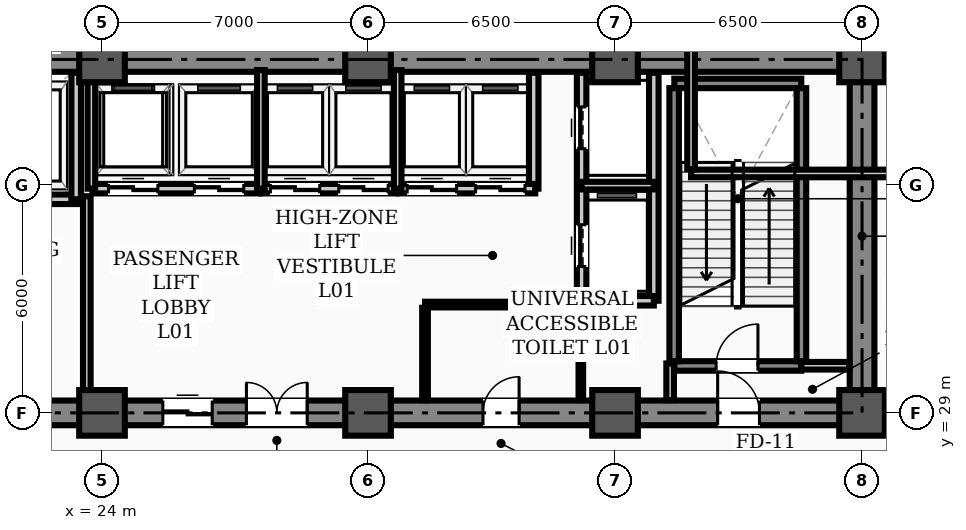
"""IFC4 building model, lengths in metres.
Left out: names, types, materials, properties, quantities, classifications, styles, units other than length and angle.
Written with IfcOpenShell. Run it as: python <this file> out.ifc"""

import sys

from ifc_helpers import new_model, si_unit, direction, frame, frame_2d, origin, origin_2d, place, context, subcontext, project, spatial, rectangle, hollow_rectangle, extrude, element, fill, save


model = new_model("IFC4")
c1 = context("Model", 3, precision=1e-05, world=origin(), true_north=direction((0.0, 1.0)))
c2 = subcontext(c1, "Body", "Model", "MODEL_VIEW")
j1 = project(units=[si_unit("LENGTHUNIT", "METRE"), si_unit("PLANEANGLEUNIT", "RADIAN")], contexts=[c1])
p1 = place(None, origin())
s1 = spatial("IfcSite", under=j1, at=p1, CompositionType="ELEMENT")
p2 = place(p1, origin())
s2 = spatial("IfcBuilding", under=s1, at=p2, CompositionType="ELEMENT")
p3 = place(p2, origin())
s3 = spatial("IfcBuildingStorey", under=s2, at=p3, CompositionType="ELEMENT", Elevation=0.0)
for number, where, z_axis, x_axis in (
    (1, (24.0, 29.0, 0.0), (0.0, 0.0, 1.0), (1.0, 0.0, 0.0)),
    (2, (24.0, 38.3, 0.0), (0.0, 0.0, 1.0), (1.0, 0.0, 0.0)),
    (3, (31.0, 29.0, 0.0), (0.0, 0.0, 1.0), (1.0, 0.0, 0.0)),
    (4, (31.0, 38.3, 0.0), (0.0, 0.0, 1.0), (1.0, 0.0, 0.0)),
    (5, (37.5, 29.0, 0.0), (0.0, 0.0, 1.0), (1.0, 0.0, 0.0)),
    (6, (37.5, 38.3, 0.0), (0.0, 0.0, 1.0), (1.0, 0.0, 0.0)),
    (7, (44.0, 29.0, 0.0), (0.0, 0.0, 1.0), (1.0, 0.0, 0.0)),
    (8, (44.0, 38.3, 0.0), (0.0, 0.0, 1.0), (1.0, 0.0, 0.0)),
):
    element("IfcColumn", number, at=place(p3, frame(where, z_axis=z_axis, x_axis=x_axis)), inside=s3, PredefinedType="COLUMN", context=c2, shape_type="SweptSolid", body=[
        extrude(hollow_rectangle(XDim=1.2, YDim=1.2, WallThickness=0.04, InnerFilletRadius=0.02, OuterFilletRadius=0.06, at=origin_2d()), origin(), (0.0, 0.0, 1.0), 5.8),
    ])
p4 = place(p3, frame((13.5, 29.0, 0.0), z_axis=(0.0, 0.0, 1.0), x_axis=(1.0, 0.0, 0.0)))
e9 = element("IfcWall", 9, at=p4, inside=s3, PredefinedType="SHEAR", context=c2, shape_type="SweptSolid", body=[
    extrude(rectangle(XDim=30.5, YDim=0.65, at=frame_2d((15.25, 0.0))), origin(), (0.0, 0.0, 1.0), 5.55),
])
p5 = place(p4, frame((1.75, 0.0, 0.0)))
e10 = element("IfcOpeningElement", 10, at=p5, cuts=e9, PredefinedType="OPENING", context=c2, shape_type="SweptSolid", body=[
    extrude(rectangle(XDim=1.1, YDim=2.08, at=frame_2d((0.55, 1.04))), frame((0.0, 0.335, 0.0), z_axis=(0.0, -1.0, 0.0), x_axis=(1.0, 0.0, 0.0)), (0.0, 0.0, 1.0), 0.67),
])
p6 = place(p4, frame((26.7, 0.0, 0.0)))
e11 = element("IfcOpeningElement", 11, at=p6, cuts=e9, PredefinedType="OPENING", context=c2, shape_type="SweptSolid", body=[
    extrude(rectangle(XDim=1.1, YDim=2.08, at=frame_2d((0.55, 1.04))), frame((0.0, 0.335, 0.0), z_axis=(0.0, -1.0, 0.0), x_axis=(1.0, 0.0, 0.0)), (0.0, 0.0, 1.0), 0.67),
])
p7 = place(p4, frame((6.8, 0.0, 0.0)))
e12 = element("IfcOpeningElement", 12, at=p7, cuts=e9, PredefinedType="OPENING", context=c2, shape_type="SweptSolid", body=[
    extrude(rectangle(XDim=1.1, YDim=2.08, at=frame_2d((0.55, 1.04))), frame((0.0, 0.335, 0.0), z_axis=(0.0, -1.0, 0.0), x_axis=(1.0, 0.0, 0.0)), (0.0, 0.0, 1.0), 0.67),
])
p8 = place(p4, frame((14.3, 0.0, 0.0)))
e13 = element("IfcOpeningElement", 13, at=p8, cuts=e9, PredefinedType="OPENING", context=c2, shape_type="SweptSolid", body=[
    extrude(rectangle(XDim=1.6, YDim=2.08, at=frame_2d((0.8, 1.04))), frame((0.0, 0.335, 0.0), z_axis=(0.0, -1.0, 0.0), x_axis=(1.0, 0.0, 0.0)), (0.0, 0.0, 1.0), 0.67),
])
p9 = place(p4, frame((20.525, 0.0, 0.0)))
e14 = element("IfcOpeningElement", 14, at=p9, cuts=e9, PredefinedType="OPENING", context=c2, shape_type="SweptSolid", body=[
    extrude(rectangle(XDim=0.95, YDim=2.08, at=frame_2d((0.475, 1.04))), frame((0.0, 0.335, 0.0), z_axis=(0.0, -1.0, 0.0), x_axis=(1.0, 0.0, 0.0)), (0.0, 0.0, 1.0), 0.67),
])
p10 = place(p4, frame((12.1, 0.0, 0.0)))
e15 = element("IfcOpeningElement", 15, at=p10, cuts=e9, PredefinedType="OPENING", context=c2, shape_type="SweptSolid", body=[
    extrude(rectangle(XDim=1.3, YDim=2.08, at=frame_2d((0.65, 1.04))), frame((0.0, 0.335, 0.0), z_axis=(0.0, -1.0, 0.0), x_axis=(1.0, 0.0, 0.0)), (0.0, 0.0, 1.0), 0.67),
])
p11 = place(p3, frame((13.5, 38.3, 0.0), z_axis=(0.0, 0.0, 1.0), x_axis=(1.0, 0.0, 0.0)))
e16 = element("IfcWall", 16, at=p11, inside=s3, PredefinedType="SHEAR", context=c2, shape_type="SweptSolid", body=[
    extrude(rectangle(XDim=30.5, YDim=0.65, at=frame_2d((15.25, 0.0))), origin(), (0.0, 0.0, 1.0), 5.55),
])
p12 = place(p3, frame((44.0, 29.35, 0.0), z_axis=(0.0, 0.0, 1.0), x_axis=(0.0, 1.0, 0.0)))
e17 = element("IfcWall", 17, at=p12, inside=s3, PredefinedType="SHEAR", context=c2, shape_type="SweptSolid", body=[
    extrude(rectangle(XDim=8.6, YDim=0.65, at=frame_2d((4.3, 0.0))), origin(), (0.0, 0.0, 1.0), 5.55),
])
p13 = place(p3, frame((39.06, 30.235, 0.0), z_axis=(0.0, 0.0, 1.0), x_axis=(1.0, 0.0, 0.0)))
e18 = element("IfcWall", 18, at=p13, inside=s3, PredefinedType="STANDARD", context=c2, shape_type="SweptSolid", body=[
    extrude(rectangle(XDim=3.34, YDim=0.25, at=frame_2d((1.67, 0.0))), origin(), (0.0, 0.0, 1.0), 5.55),
])
p14 = place(p13, frame((1.1, 0.0, 0.0)))
e19 = element("IfcOpeningElement", 19, at=p14, cuts=e18, PredefinedType="OPENING", context=c2, shape_type="SweptSolid", body=[
    extrude(rectangle(XDim=1.1, YDim=2.08, at=frame_2d((0.55, 1.04))), frame((0.0, 0.135, 0.0), z_axis=(0.0, -1.0, 0.0), x_axis=(1.0, 0.0, 0.0)), (0.0, 0.0, 1.0), 0.27),
])
p15 = place(p3, frame((39.06, 37.669, 0.0), z_axis=(0.0, 0.0, 1.0), x_axis=(1.0, 0.0, 0.0)))
e20 = element("IfcWall", 20, at=p15, inside=s3, PredefinedType="STANDARD", context=c2, shape_type="SweptSolid", body=[
    extrude(rectangle(XDim=3.34, YDim=0.25, at=frame_2d((1.67, 0.0))), origin(), (0.0, 0.0, 1.0), 5.55),
])
for number, where, z_axis, x_axis in (
    (21, (39.055, 30.36, 0.0), (0.0, 0.0, 1.0), (0.0, 1.0, 0.0)),
    (22, (42.405, 30.36, 0.0), (0.0, 0.0, 1.0), (0.0, 1.0, 0.0)),
):
    element("IfcWall", number, at=place(p3, frame(where, z_axis=z_axis, x_axis=x_axis)), inside=s3, PredefinedType="STANDARD", context=c2, shape_type="SweptSolid", body=[
        extrude(rectangle(XDim=7.184, YDim=0.25, at=frame_2d((3.592, 0.0))), origin(), (0.0, 0.0, 1.0), 5.55),
    ])
p16 = place(p3, frame((18.1, 34.62, 0.0), z_axis=(0.0, 0.0, 1.0), x_axis=(1.0, 0.0, 0.0)))
e23 = element("IfcWall", 23, at=p16, inside=s3, PredefinedType="STANDARD", context=c2, shape_type="SweptSolid", body=[
    extrude(rectangle(XDim=5.35, YDim=0.25, at=frame_2d((2.675, 0.0))), origin(), (0.0, 0.0, 1.0), 5.55),
])
p17 = place(p16, frame((0.85, 0.0, 0.0)))
e24 = element("IfcOpeningElement", 24, at=p17, cuts=e23, PredefinedType="OPENING", context=c2, shape_type="SweptSolid", body=[
    extrude(rectangle(XDim=1.1, YDim=2.08, at=frame_2d((0.55, 1.04))), frame((0.0, 0.135, 0.0), z_axis=(0.0, -1.0, 0.0), x_axis=(1.0, 0.0, 0.0)), (0.0, 0.0, 1.0), 0.27),
])
p18 = place(p16, frame((3.45, 0.0, 0.0)))
e25 = element("IfcOpeningElement", 25, at=p18, cuts=e23, PredefinedType="OPENING", context=c2, shape_type="SweptSolid", body=[
    extrude(rectangle(XDim=1.1, YDim=2.08, at=frame_2d((0.55, 1.04))), frame((0.0, 0.135, 0.0), z_axis=(0.0, -1.0, 0.0), x_axis=(1.0, 0.0, 0.0)), (0.0, 0.0, 1.0), 0.27),
])
p19 = place(p3, frame((36.62, 31.95, 0.0), z_axis=(0.0, 0.0, 1.0), x_axis=(0.0, 1.0, 0.0)))
e26 = element("IfcWall", 26, at=p19, inside=s3, PredefinedType="STANDARD", context=c2, shape_type="SweptSolid", body=[
    extrude(rectangle(XDim=6.0, YDim=0.25, at=frame_2d((3.0, 0.0))), origin(), (0.0, 0.0, 1.0), 4.73),
])
p20 = place(p19, frame((0.9, 0.0, 0.0)))
e27 = element("IfcOpeningElement", 27, at=p20, cuts=e26, PredefinedType="OPENING", context=c2, shape_type="SweptSolid", body=[
    extrude(rectangle(XDim=1.1, YDim=2.08, at=frame_2d((0.55, 1.04))), frame((0.0, 0.135, 0.0), z_axis=(0.0, -1.0, 0.0), x_axis=(1.0, 0.0, 0.0)), (0.0, 0.0, 1.0), 0.27),
])
p21 = place(p19, frame((4.0, 0.0, 0.0)))
e28 = element("IfcOpeningElement", 28, at=p21, cuts=e26, PredefinedType="OPENING", context=c2, shape_type="SweptSolid", body=[
    extrude(rectangle(XDim=1.1, YDim=2.08, at=frame_2d((0.55, 1.04))), frame((0.0, 0.135, 0.0), z_axis=(0.0, -1.0, 0.0), x_axis=(1.0, 0.0, 0.0)), (0.0, 0.0, 1.0), 0.27),
])
p22 = place(p3, frame((38.52, 31.95, 0.0), z_axis=(0.0, 0.0, 1.0), x_axis=(0.0, 1.0, 0.0)))
e29 = element("IfcWall", 29, at=p22, inside=s3, PredefinedType="STANDARD", context=c2, shape_type="SweptSolid", body=[
    extrude(rectangle(XDim=6.0, YDim=0.25, at=frame_2d((3.0, 0.0))), origin(), (0.0, 0.0, 1.0), 4.73),
])
p23 = place(p3, frame((36.62, 31.95, 0.0), z_axis=(0.0, 0.0, 1.0), x_axis=(1.0, 0.0, 0.0)))
e30 = element("IfcWall", 30, at=p23, inside=s3, PredefinedType="STANDARD", context=c2, shape_type="SweptSolid", body=[
    extrude(rectangle(XDim=1.9, YDim=0.25, at=frame_2d((0.95, 0.0))), origin(), (0.0, 0.0, 1.0), 5.38),
])
p24 = place(p3, frame((23.32, 34.62, 0.0), z_axis=(0.0, 0.0, 1.0), x_axis=(0.0, 1.0, 0.0)))
e31 = element("IfcWall", 31, at=p24, inside=s3, PredefinedType="STANDARD", context=c2, shape_type="SweptSolid", body=[
    extrude(rectangle(XDim=3.33, YDim=0.25, at=frame_2d((1.665, 0.0))), origin(), (0.0, 0.0, 1.0), 4.73),
])
p25 = place(p3, frame((35.36, 34.9, 0.0), z_axis=(0.0, 0.0, 1.0), x_axis=(0.0, 1.0, 0.0)))
e32 = element("IfcWall", 32, at=p25, inside=s3, PredefinedType="STANDARD", context=c2, shape_type="SweptSolid", body=[
    extrude(rectangle(XDim=3.05, YDim=0.25, at=frame_2d((1.525, 0.0))), origin(), (0.0, 0.0, 1.0), 4.73),
])
p26 = place(p3, frame((23.75, 34.9, 0.0), z_axis=(0.0, 0.0, 1.0), x_axis=(1.0, 0.0, 0.0)))
e33 = element("IfcWall", 33, at=p26, inside=s3, PredefinedType="STANDARD", context=c2, shape_type="SweptSolid", body=[
    extrude(rectangle(XDim=4.4, YDim=0.25, at=frame_2d((2.2, 0.0))), origin(), (0.0, 0.0, 1.0), 5.55),
])
p27 = place(p26, frame((0.42, 0.0, 0.0)))
e34 = element("IfcOpeningElement", 34, at=p27, cuts=e33, PredefinedType="OPENING", context=c2, shape_type="SweptSolid", body=[
    extrude(rectangle(XDim=1.3, YDim=2.08, at=frame_2d((0.65, 1.04))), frame((0.0, 0.135, 0.0), z_axis=(0.0, -1.0, 0.0), x_axis=(1.0, 0.0, 0.0)), (0.0, 0.0, 1.0), 0.27),
])
p28 = place(p26, frame((2.68, 0.0, 0.0)))
e35 = element("IfcOpeningElement", 35, at=p28, cuts=e33, PredefinedType="OPENING", context=c2, shape_type="SweptSolid", body=[
    extrude(rectangle(XDim=1.3, YDim=2.08, at=frame_2d((0.65, 1.04))), frame((0.0, 0.135, 0.0), z_axis=(0.0, -1.0, 0.0), x_axis=(1.0, 0.0, 0.0)), (0.0, 0.0, 1.0), 0.27),
])
p29 = place(p3, frame((28.2, 34.9, 0.0), z_axis=(0.0, 0.0, 1.0), x_axis=(1.0, 0.0, 0.0)))
e36 = element("IfcWall", 36, at=p29, inside=s3, PredefinedType="STANDARD", context=c2, shape_type="SweptSolid", body=[
    extrude(rectangle(XDim=3.55, YDim=0.25, at=frame_2d((1.775, 0.0))), origin(), (0.0, 0.0, 1.0), 5.55),
])
p30 = place(p29, frame((0.23, 0.0, 0.0)))
e37 = element("IfcOpeningElement", 37, at=p30, cuts=e36, PredefinedType="OPENING", context=c2, shape_type="SweptSolid", body=[
    extrude(rectangle(XDim=1.3, YDim=2.08, at=frame_2d((0.65, 1.04))), frame((0.0, 0.135, 0.0), z_axis=(0.0, -1.0, 0.0), x_axis=(1.0, 0.0, 0.0)), (0.0, 0.0, 1.0), 0.27),
])
p31 = place(p29, frame((2.03, 0.0, 0.0)))
e38 = element("IfcOpeningElement", 38, at=p31, cuts=e36, PredefinedType="OPENING", context=c2, shape_type="SweptSolid", body=[
    extrude(rectangle(XDim=1.3, YDim=2.08, at=frame_2d((0.65, 1.04))), frame((0.0, 0.135, 0.0), z_axis=(0.0, -1.0, 0.0), x_axis=(1.0, 0.0, 0.0)), (0.0, 0.0, 1.0), 0.27),
])
p32 = place(p3, frame((31.8, 34.9, 0.0), z_axis=(0.0, 0.0, 1.0), x_axis=(1.0, 0.0, 0.0)))
e39 = element("IfcWall", 39, at=p32, inside=s3, PredefinedType="STANDARD", context=c2, shape_type="SweptSolid", body=[
    extrude(rectangle(XDim=3.6, YDim=0.25, at=frame_2d((1.8, 0.0))), origin(), (0.0, 0.0, 1.0), 5.55),
])
p33 = place(p32, frame((0.23, 0.0, 0.0)))
e40 = element("IfcOpeningElement", 40, at=p33, cuts=e39, PredefinedType="OPENING", context=c2, shape_type="SweptSolid", body=[
    extrude(rectangle(XDim=1.3, YDim=2.08, at=frame_2d((0.65, 1.04))), frame((0.0, 0.135, 0.0), z_axis=(0.0, -1.0, 0.0), x_axis=(1.0, 0.0, 0.0)), (0.0, 0.0, 1.0), 0.27),
])
p34 = place(p32, frame((2.03, 0.0, 0.0)))
e41 = element("IfcOpeningElement", 41, at=p34, cuts=e39, PredefinedType="OPENING", context=c2, shape_type="SweptSolid", body=[
    extrude(rectangle(XDim=1.3, YDim=2.08, at=frame_2d((0.65, 1.04))), frame((0.0, 0.135, 0.0), z_axis=(0.0, -1.0, 0.0), x_axis=(1.0, 0.0, 0.0)), (0.0, 0.0, 1.0), 0.27),
])
p35 = place(p3, frame((39.5, 35.3, 0.0), z_axis=(0.0, 0.0, 1.0), x_axis=(1.0, 0.0, 0.0)))
e42 = element("IfcWall", 42, at=p35, inside=s3, PredefinedType="STANDARD", context=c2, shape_type="SweptSolid", body=[
    extrude(rectangle(XDim=8.9, YDim=0.2, at=frame_2d((4.45, 0.0))), origin(), (0.0, 0.0, 1.0), 4.83),
])
p36 = place(p3, frame((42.4, 30.24, 0.0), z_axis=(0.0, 0.0, 1.0), x_axis=(1.0, 0.0, 0.0)))
e43 = element("IfcWall", 43, at=p36, inside=s3, PredefinedType="STANDARD", context=c2, shape_type="SweptSolid", body=[
    extrude(rectangle(XDim=1.265, YDim=0.2, at=frame_2d((0.633, 0.0))), origin(), (0.0, 0.0, 1.0), 4.83),
])
p37 = place(p3, frame((32.5, 31.85, 0.0), z_axis=(0.0, 0.0, 1.0), x_axis=(1.0, 0.0, 0.0)))
e44 = element("IfcWall", 44, at=p37, inside=s3, PredefinedType="PARTITIONING", context=c2, shape_type="SweptSolid", body=[
    extrude(rectangle(XDim=4.1, YDim=0.15, at=frame_2d((2.05, 0.0))), origin(), (0.0, 0.0, 1.0), 5.55),
])
p38 = place(p3, frame((39.5, 35.41, 0.0), z_axis=(0.0, 0.0, 1.0), x_axis=(0.0, 1.0, 0.0)))
e45 = element("IfcWall", 45, at=p38, inside=s3, PredefinedType="STANDARD", context=c2, shape_type="SweptSolid", body=[
    extrude(rectangle(XDim=15.62, YDim=0.2, at=frame_2d((7.81, 0.0))), origin(), (0.0, 0.0, 1.0), 4.73),
])
p39 = place(p3, frame((38.95, 29.335, 0.0), z_axis=(0.0, 0.0, 1.0), x_axis=(0.0, 1.0, 0.0)))
e46 = element("IfcWall", 46, at=p39, inside=s3, PredefinedType="STANDARD", context=c2, shape_type="SweptSolid", body=[
    extrude(rectangle(XDim=0.965, YDim=0.2, at=frame_2d((0.482, 0.0))), origin(), (0.0, 0.0, 1.0), 4.73),
])
p40 = place(p3, frame((23.6, 29.335, 0.0), z_axis=(0.0, 0.0, 1.0), x_axis=(0.0, 1.0, 0.0)))
e47 = element("IfcWall", 47, at=p40, inside=s3, PredefinedType="STANDARD", context=c2, shape_type="SweptSolid", body=[
    extrude(rectangle(XDim=5.365, YDim=0.2, at=frame_2d((2.683, 0.0))), origin(), (0.0, 0.0, 1.0), 4.73),
])
p41 = place(p3, frame((32.5, 29.335, 0.0), z_axis=(0.0, 0.0, 1.0), x_axis=(0.0, 1.0, 0.0)))
e48 = element("IfcWall", 48, at=p41, inside=s3, PredefinedType="PARTITIONING", context=c2, shape_type="SweptSolid", body=[
    extrude(rectangle(XDim=2.43, YDim=0.15, at=frame_2d((1.215, 0.0))), origin(), (0.0, 0.0, 1.0), 4.73),
])
p42 = place(p3, frame((36.6, 29.335, 0.0), z_axis=(0.0, 0.0, 1.0), x_axis=(0.0, 1.0, 0.0)))
e49 = element("IfcWall", 49, at=p42, inside=s3, PredefinedType="PARTITIONING", context=c2, shape_type="SweptSolid", body=[
    extrude(rectangle(XDim=2.43, YDim=0.12, at=frame_2d((1.215, 0.0))), origin(), (0.0, 0.0, 1.0), 4.73),
])
p43 = place(p3, frame((36.62, 34.98, 0.0), z_axis=(0.0, 0.0, 1.0), x_axis=(1.0, 0.0, 0.0)))
e50 = element("IfcWall", 50, at=p43, inside=s3, PredefinedType="STANDARD", context=c2, shape_type="SweptSolid", body=[
    extrude(rectangle(XDim=1.9, YDim=0.2, at=frame_2d((0.95, 0.0))), origin(), (0.0, 0.0, 1.0), 5.55),
])
for number, where, z_axis, x_axis in (
    (51, (23.72, 34.9, 0.0), (0.0, 0.0, 1.0), (0.0, 1.0, 0.0)),
    (52, (28.18, 34.9, 0.0), (0.0, 0.0, 1.0), (0.0, 1.0, 0.0)),
    (53, (31.78, 34.9, 0.0), (0.0, 0.0, 1.0), (0.0, 1.0, 0.0)),
):
    element("IfcWall", number, at=place(p3, frame(where, z_axis=z_axis, x_axis=x_axis)), inside=s3, PredefinedType="STANDARD", context=c2, shape_type="SweptSolid", body=[
        extrude(rectangle(XDim=3.12, YDim=0.2, at=frame_2d((1.56, 0.0))), origin(), (0.0, 0.0, 1.0), 4.73),
    ])
p44 = place(p14, origin())
e54 = element("IfcDoor", 54, at=p44, inside=s3, OperationType="SINGLE_SWING_RIGHT", PredefinedType="DOOR", context=c2, shape_type="SweptSolid", body=[
    extrude(rectangle(XDim=1.1, YDim=2.08, at=frame_2d((0.55, 1.04))), frame((0.0, 0.025, 0.0), z_axis=(0.0, -1.0, 0.0), x_axis=(1.0, 0.0, 0.0)), (0.0, 0.0, 1.0), 0.05),
])
fill(e19, e54)
p45 = place(p6, origin())
e55 = element("IfcDoor", 55, at=p45, inside=s3, OperationType="SINGLE_SWING_LEFT", PredefinedType="DOOR", context=c2, shape_type="SweptSolid", body=[
    extrude(rectangle(XDim=1.1, YDim=2.08, at=frame_2d((0.55, 1.04))), frame((0.0, 0.025, 0.0), z_axis=(0.0, -1.0, 0.0), x_axis=(1.0, 0.0, 0.0)), (0.0, 0.0, 1.0), 0.05),
])
fill(e11, e55)
p46 = place(p8, origin())
e56 = element("IfcDoor", 56, at=p46, inside=s3, OperationType="DOUBLE_DOOR_SINGLE_SWING", PredefinedType="DOOR", context=c2, shape_type="SweptSolid", body=[
    extrude(rectangle(XDim=1.6, YDim=2.08, at=frame_2d((0.8, 1.04))), frame((0.0, 0.025, 0.0), z_axis=(0.0, -1.0, 0.0), x_axis=(1.0, 0.0, 0.0)), (0.0, 0.0, 1.0), 0.05),
])
fill(e13, e56)
p47 = place(p9, origin())
e57 = element("IfcDoor", 57, at=p47, inside=s3, OperationType="SINGLE_SWING_RIGHT", PredefinedType="DOOR", context=c2, shape_type="SweptSolid", body=[
    extrude(rectangle(XDim=0.95, YDim=2.08, at=frame_2d((0.475, 1.04))), frame((0.0, 0.025, 0.0), z_axis=(0.0, -1.0, 0.0), x_axis=(1.0, 0.0, 0.0)), (0.0, 0.0, 1.0), 0.05),
])
fill(e14, e57)
p48 = place(p20, origin())
e58 = element("IfcDoor", 58, at=p48, inside=s3, OperationType="SLIDING_TO_LEFT", PredefinedType="DOOR", context=c2, shape_type="SweptSolid", body=[
    extrude(rectangle(XDim=1.1, YDim=2.08, at=frame_2d((0.55, 1.04))), frame((0.0, 0.025, 0.0), z_axis=(0.0, -1.0, 0.0), x_axis=(1.0, 0.0, 0.0)), (0.0, 0.0, 1.0), 0.05),
])
fill(e27, e58)
p49 = place(p21, origin())
e59 = element("IfcDoor", 59, at=p49, inside=s3, OperationType="SLIDING_TO_LEFT", PredefinedType="DOOR", context=c2, shape_type="SweptSolid", body=[
    extrude(rectangle(XDim=1.1, YDim=2.08, at=frame_2d((0.55, 1.04))), frame((0.0, 0.025, 0.0), z_axis=(0.0, -1.0, 0.0), x_axis=(1.0, 0.0, 0.0)), (0.0, 0.0, 1.0), 0.05),
])
fill(e28, e59)
p50 = place(p27, origin())
e60 = element("IfcDoor", 60, at=p50, inside=s3, OperationType="DOUBLE_DOOR_SLIDING", PredefinedType="DOOR", context=c2, shape_type="SweptSolid", body=[
    extrude(rectangle(XDim=1.3, YDim=2.08, at=frame_2d((0.65, 1.04))), frame((0.0, 0.025, 0.0), z_axis=(0.0, -1.0, 0.0), x_axis=(1.0, 0.0, 0.0)), (0.0, 0.0, 1.0), 0.05),
])
fill(e34, e60)
p51 = place(p28, origin())
e61 = element("IfcDoor", 61, at=p51, inside=s3, OperationType="DOUBLE_DOOR_SLIDING", PredefinedType="DOOR", context=c2, shape_type="SweptSolid", body=[
    extrude(rectangle(XDim=1.3, YDim=2.08, at=frame_2d((0.65, 1.04))), frame((0.0, 0.025, 0.0), z_axis=(0.0, -1.0, 0.0), x_axis=(1.0, 0.0, 0.0)), (0.0, 0.0, 1.0), 0.05),
])
fill(e35, e61)
p52 = place(p30, origin())
e62 = element("IfcDoor", 62, at=p52, inside=s3, OperationType="DOUBLE_DOOR_SLIDING", PredefinedType="DOOR", context=c2, shape_type="SweptSolid", body=[
    extrude(rectangle(XDim=1.3, YDim=2.08, at=frame_2d((0.65, 1.04))), frame((0.0, 0.025, 0.0), z_axis=(0.0, -1.0, 0.0), x_axis=(1.0, 0.0, 0.0)), (0.0, 0.0, 1.0), 0.05),
])
fill(e37, e62)
p53 = place(p31, origin())
e63 = element("IfcDoor", 63, at=p53, inside=s3, OperationType="DOUBLE_DOOR_SLIDING", PredefinedType="DOOR", context=c2, shape_type="SweptSolid", body=[
    extrude(rectangle(XDim=1.3, YDim=2.08, at=frame_2d((0.65, 1.04))), frame((0.0, 0.025, 0.0), z_axis=(0.0, -1.0, 0.0), x_axis=(1.0, 0.0, 0.0)), (0.0, 0.0, 1.0), 0.05),
])
fill(e38, e63)
p54 = place(p33, origin())
e64 = element("IfcDoor", 64, at=p54, inside=s3, OperationType="DOUBLE_DOOR_SLIDING", PredefinedType="DOOR", context=c2, shape_type="SweptSolid", body=[
    extrude(rectangle(XDim=1.3, YDim=2.08, at=frame_2d((0.65, 1.04))), frame((0.0, 0.025, 0.0), z_axis=(0.0, -1.0, 0.0), x_axis=(1.0, 0.0, 0.0)), (0.0, 0.0, 1.0), 0.05),
])
fill(e40, e64)
p55 = place(p34, origin())
e65 = element("IfcDoor", 65, at=p55, inside=s3, OperationType="DOUBLE_DOOR_SLIDING", PredefinedType="DOOR", context=c2, shape_type="SweptSolid", body=[
    extrude(rectangle(XDim=1.3, YDim=2.08, at=frame_2d((0.65, 1.04))), frame((0.0, 0.025, 0.0), z_axis=(0.0, -1.0, 0.0), x_axis=(1.0, 0.0, 0.0)), (0.0, 0.0, 1.0), 0.05),
])
fill(e41, e65)
p56 = place(p10, origin())
e66 = element("IfcDoor", 66, at=p56, inside=s3, OperationType="DOUBLE_DOOR_SLIDING", PredefinedType="DOOR", context=c2, shape_type="SweptSolid", body=[
    extrude(rectangle(XDim=1.3, YDim=2.08, at=frame_2d((0.65, 1.04))), frame((0.0, 0.025, 0.0), z_axis=(0.0, -1.0, 0.0), x_axis=(1.0, 0.0, 0.0)), (0.0, 0.0, 1.0), 0.05),
])
fill(e15, e66)
save(model, sys.argv[1])
